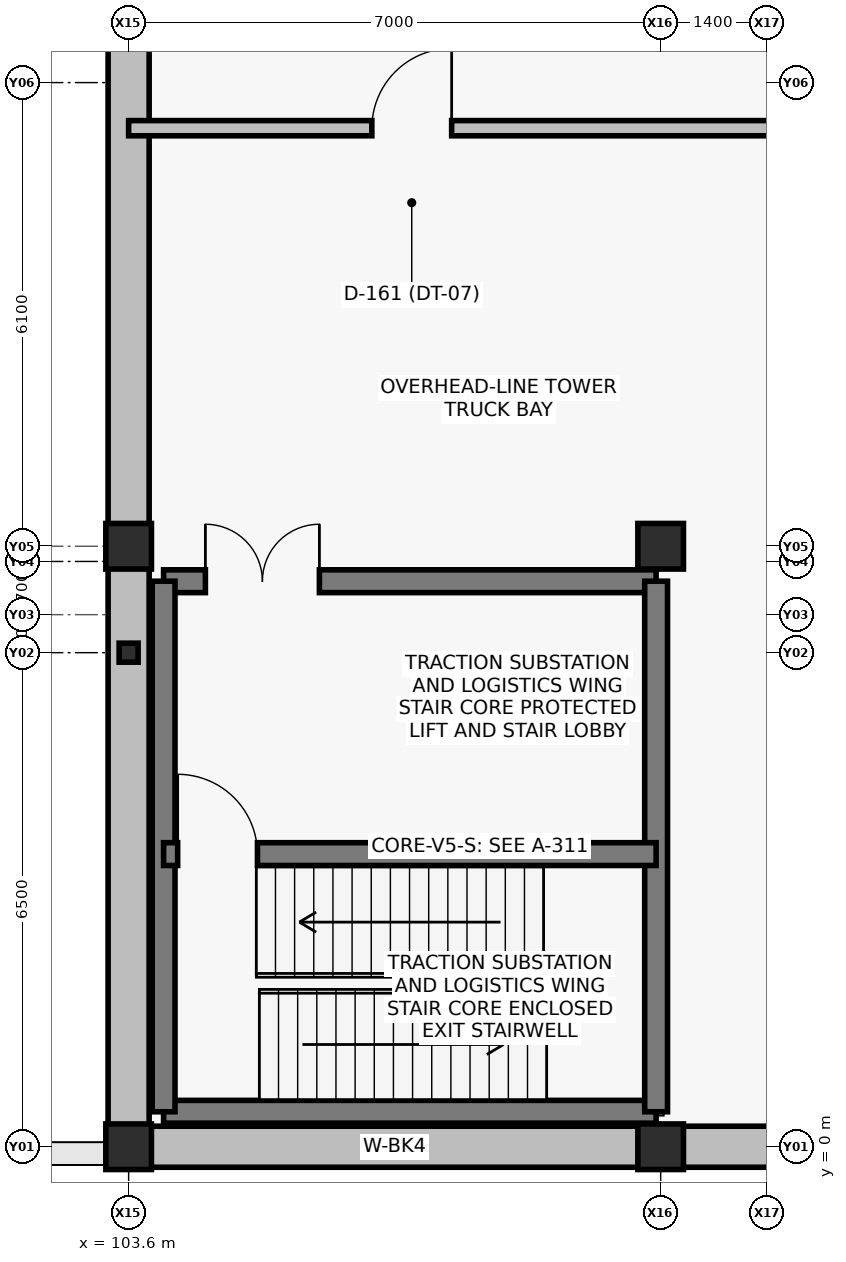
"""IFC4 building model, lengths in metres.
Left out: names, types, materials, properties, quantities, classifications, styles, units other than length and angle.
Written with IfcOpenShell. Run it as: python <this file> out.ifc"""

import sys

from ifc_helpers import new_model, si_unit, direction, frame, frame_2d, origin, origin_2d, place, context, subcontext, project, spatial, rectangle, hollow_rectangle, extrude, element, fill, save


model = new_model("IFC4")
c1 = context("Model", 3, precision=1e-05, world=origin(), true_north=direction((0.0, 1.0)))
c2 = subcontext(c1, "Body", "Model", "MODEL_VIEW")
j1 = project(units=[si_unit("LENGTHUNIT", "METRE"), si_unit("PLANEANGLEUNIT", "RADIAN")], contexts=[c1])
p1 = place(None, origin())
s1 = spatial("IfcSite", under=j1, at=p1, CompositionType="ELEMENT")
p2 = place(p1, origin())
s2 = spatial("IfcBuilding", under=s1, at=p2, CompositionType="ELEMENT")
p3 = place(p2, origin())
s3 = spatial("IfcBuildingStorey", under=s2, at=p3, CompositionType="ELEMENT", Elevation=0.0)
for number, where, z_axis, x_axis in (
    (1, (103.6, 0.0, -0.35), (0.0, 0.0, 1.0), (1.0, 0.0, 0.0)),
    (2, (103.6, 7.9, -0.35), (0.0, 0.0, 1.0), (1.0, 0.0, 0.0)),
    (3, (110.6, 0.0, -0.35), (0.0, 0.0, 1.0), (1.0, 0.0, 0.0)),
    (4, (110.6, 7.9, -0.35), (0.0, 0.0, 1.0), (1.0, 0.0, 0.0)),
):
    element("IfcColumn", number, at=place(p3, frame(where, z_axis=z_axis, x_axis=x_axis)), inside=s3, PredefinedType="COLUMN", context=c2, shape_type="SweptSolid", body=[
        extrude(rectangle(XDim=0.6, YDim=0.6, at=origin_2d()), origin(), (0.0, 0.0, 1.0), 6.35),
    ])
p4 = place(p3, frame((103.6, 6.5, -0.35), z_axis=(0.0, 0.0, 1.0), x_axis=(1.0, 0.0, 0.0)))
e5 = element("IfcColumn", 5, at=p4, inside=s3, PredefinedType="COLUMN", context=c2, shape_type="SweptSolid", body=[
    extrude(hollow_rectangle(XDim=0.25, YDim=0.25, WallThickness=0.009, at=origin_2d()), origin(), (0.0, 0.0, 1.0), 6.125),
])
for number, where, z_axis, x_axis in (
    (6, (103.6, 0.0, 0.0), (0.0, 0.0, 1.0), (1.0, 0.0, 0.0)),
    (7, (110.6, 0.0, 0.0), (0.0, 0.0, 1.0), (1.0, 0.0, 0.0)),
):
    element("IfcWall", number, at=place(p3, frame(where, z_axis=z_axis, x_axis=x_axis)), inside=s3, PredefinedType="SOLIDWALL", context=c2, shape_type="SweptSolid", body=[
        extrude(rectangle(XDim=7.0, YDim=0.54, at=frame_2d((3.5, 0.0))), origin(), (0.0, 0.0, 1.0), 5.25),
    ])
for number, where, z_axis, x_axis in (
    (8, (103.6, 0.0, 0.0), (0.0, 0.0, 1.0), (0.0, 1.0, 0.0)),
    (9, (103.6, 7.9, 0.0), (0.0, 0.0, 1.0), (0.0, 1.0, 0.0)),
):
    element("IfcWall", number, at=place(p3, frame(where, z_axis=z_axis, x_axis=x_axis)), inside=s3, PredefinedType="SOLIDWALL", context=c2, shape_type="SweptSolid", body=[
        extrude(rectangle(XDim=7.9, YDim=0.54, at=frame_2d((3.95, 0.0))), origin(), (0.0, 0.0, 1.0), 5.25),
    ])
p5 = place(p3, frame((104.06, 0.46, -0.35), z_axis=(0.0, 0.0, 1.0), x_axis=(1.0, 0.0, 0.0)))
e10 = element("IfcWall", 10, at=p5, inside=s3, PredefinedType="SHEAR", context=c2, shape_type="SweptSolid", body=[
    extrude(rectangle(XDim=6.48, YDim=0.3, at=frame_2d((3.24, 0.0))), origin(), (0.0, 0.0, 1.0), 6.07),
])
p6 = place(p3, frame((104.06, 7.44, -0.35), z_axis=(0.0, 0.0, 1.0), x_axis=(1.0, 0.0, 0.0)))
e11 = element("IfcWall", 11, at=p6, inside=s3, PredefinedType="SHEAR", context=c2, shape_type="SweptSolid", body=[
    extrude(rectangle(XDim=6.48, YDim=0.3, at=frame_2d((3.24, 0.0))), origin(), (0.0, 0.0, 1.0), 6.07),
])
p7 = place(p6, frame((0.55, 0.0, 0.35)))
e12 = element("IfcOpeningElement", 12, at=p7, cuts=e11, PredefinedType="OPENING", context=c2, shape_type="SweptSolid", body=[
    extrude(rectangle(XDim=1.5, YDim=2.2, at=frame_2d((0.75, 1.1))), frame((0.0, 0.16, 0.0), z_axis=(0.0, -1.0, 0.0), x_axis=(1.0, 0.0, 0.0)), (0.0, 0.0, 1.0), 0.32),
])
for number, where, z_axis, x_axis in (
    (13, (104.06, 0.46, -0.35), (0.0, 0.0, 1.0), (0.0, 1.0, 0.0)),
    (14, (110.54, 0.46, -0.35), (0.0, 0.0, 1.0), (0.0, 1.0, 0.0)),
):
    element("IfcWall", number, at=place(p3, frame(where, z_axis=z_axis, x_axis=x_axis)), inside=s3, PredefinedType="SHEAR", context=c2, shape_type="SweptSolid", body=[
        extrude(rectangle(XDim=6.98, YDim=0.3, at=frame_2d((3.49, 0.0))), origin(), (0.0, 0.0, 1.0), 6.07),
    ])
p8 = place(p3, frame((104.06, 3.85, -0.35), z_axis=(0.0, 0.0, 1.0), x_axis=(1.0, 0.0, 0.0)))
e15 = element("IfcWall", 15, at=p8, inside=s3, PredefinedType="SHEAR", context=c2, shape_type="SweptSolid", body=[
    extrude(rectangle(XDim=6.48, YDim=0.3, at=frame_2d((3.24, 0.0))), origin(), (0.0, 0.0, 1.0), 6.07),
])
p9 = place(p8, frame((0.185, 0.0, 0.35)))
e16 = element("IfcOpeningElement", 16, at=p9, cuts=e15, PredefinedType="OPENING", context=c2, shape_type="SweptSolid", body=[
    extrude(rectangle(XDim=1.05, YDim=2.15, at=frame_2d((0.525, 1.075))), frame((0.0, 0.16, 0.0), z_axis=(0.0, -1.0, 0.0), x_axis=(1.0, 0.0, 0.0)), (0.0, 0.0, 1.0), 0.32),
])
p10 = place(p3, frame((103.6, 13.4, 0.0), z_axis=(0.0, 0.0, 1.0), x_axis=(1.0, 0.0, 0.0)))
e17 = element("IfcWall", 17, at=p10, inside=s3, PredefinedType="PARTITIONING", context=c2, shape_type="SweptSolid", body=[
    extrude(rectangle(XDim=42.0, YDim=0.2, at=frame_2d((21.0, 0.0))), origin(), (0.0, 0.0, 1.0), 5.1),
])
p11 = place(p10, frame((3.2, 0.0, 0.0)))
e18 = element("IfcOpeningElement", 18, at=p11, cuts=e17, PredefinedType="OPENING", context=c2, shape_type="SweptSolid", body=[
    extrude(rectangle(XDim=1.05, YDim=2.15, at=frame_2d((0.525, 1.075))), frame((0.0, 0.11, 0.0), z_axis=(0.0, -1.0, 0.0), x_axis=(1.0, 0.0, 0.0)), (0.0, 0.0, 1.0), 0.22),
])
p12 = place(p10, frame((16.5, 0.0, 0.0)))
e19 = element("IfcOpeningElement", 19, at=p12, cuts=e17, PredefinedType="OPENING", context=c2, shape_type="SweptSolid", body=[
    extrude(rectangle(XDim=1.8, YDim=2.3, at=frame_2d((0.9, 1.15))), frame((0.0, 0.11, 0.0), z_axis=(0.0, -1.0, 0.0), x_axis=(1.0, 0.0, 0.0)), (0.0, 0.0, 1.0), 0.22),
])
p13 = place(p10, frame((32.5, 0.0, 0.0)))
e20 = element("IfcOpeningElement", 20, at=p13, cuts=e17, PredefinedType="OPENING", context=c2, shape_type="SweptSolid", body=[
    extrude(rectangle(XDim=1.35, YDim=2.2, at=frame_2d((0.675, 1.1))), frame((0.0, 0.11, 0.0), z_axis=(0.0, -1.0, 0.0), x_axis=(1.0, 0.0, 0.0)), (0.0, 0.0, 1.0), 0.22),
])
p14 = place(p9, origin())
e21 = element("IfcDoor", 21, at=p14, inside=s3, OperationType="SINGLE_SWING_LEFT", PredefinedType="DOOR", context=c2, shape_type="SweptSolid", body=[
    extrude(rectangle(XDim=1.05, YDim=2.15, at=frame_2d((0.525, 1.075))), frame((0.0, 0.025, 0.0), z_axis=(0.0, -1.0, 0.0), x_axis=(1.0, 0.0, 0.0)), (0.0, 0.0, 1.0), 0.05),
])
fill(e16, e21)
p15 = place(p7, origin())
e22 = element("IfcDoor", 22, at=p15, inside=s3, OperationType="DOUBLE_DOOR_SINGLE_SWING", PredefinedType="DOOR", context=c2, shape_type="SweptSolid", body=[
    extrude(rectangle(XDim=1.5, YDim=2.2, at=frame_2d((0.75, 1.1))), frame((0.0, 0.025, 0.0), z_axis=(0.0, -1.0, 0.0), x_axis=(1.0, 0.0, 0.0)), (0.0, 0.0, 1.0), 0.05),
])
fill(e12, e22)
p16 = place(p11, origin())
e23 = element("IfcDoor", 23, at=p16, inside=s3, OperationType="SINGLE_SWING_RIGHT", PredefinedType="DOOR", context=c2, shape_type="SweptSolid", body=[
    extrude(rectangle(XDim=1.05, YDim=2.15, at=frame_2d((0.525, 1.075))), frame((0.0, 0.025, 0.0), z_axis=(0.0, -1.0, 0.0), x_axis=(1.0, 0.0, 0.0)), (0.0, 0.0, 1.0), 0.05),
])
fill(e18, e23)
save(model, sys.argv[1])
